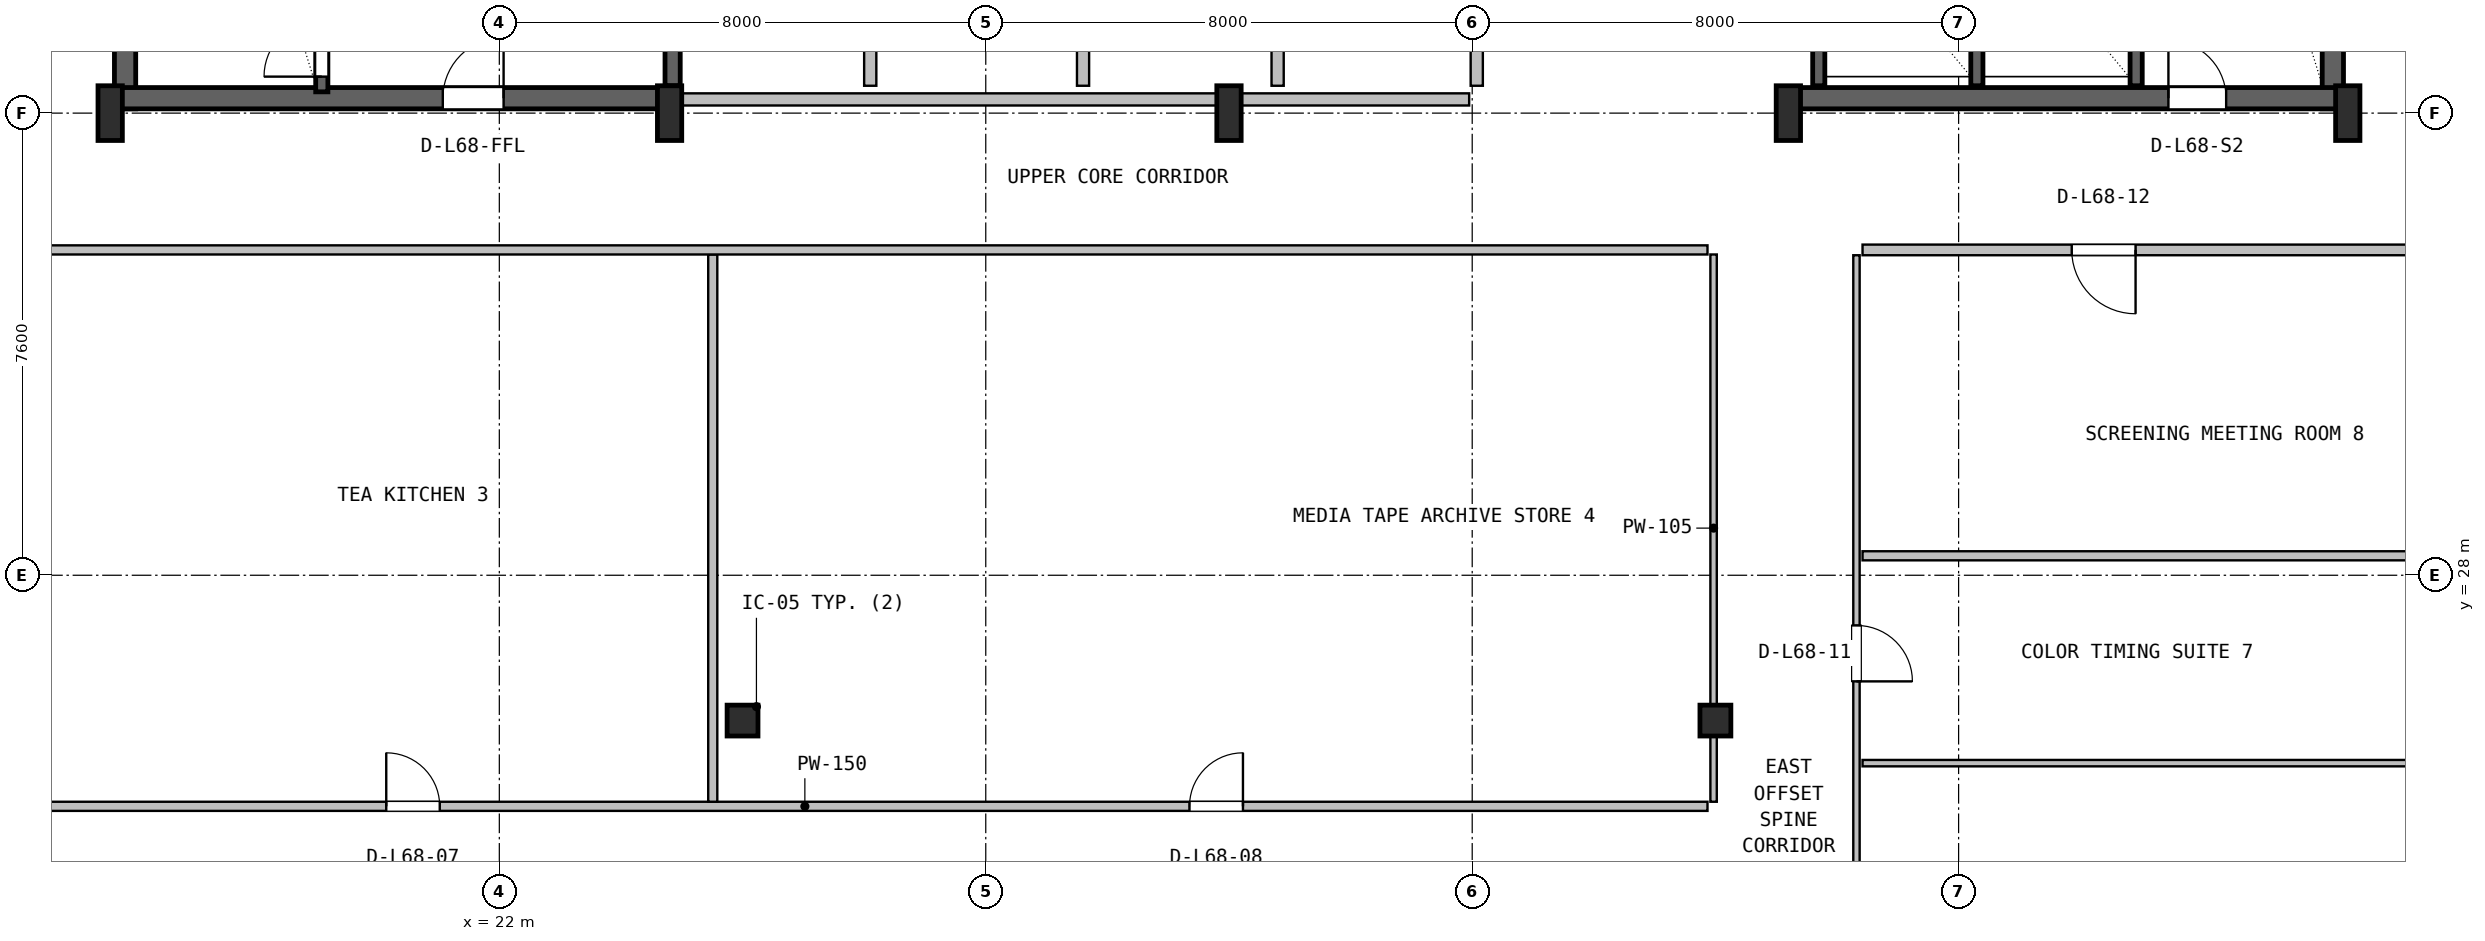
"""IFC4 building model, lengths in metres.
Left out: names, types, materials, properties, quantities, classifications, styles, units other than length and angle.
Written with IfcOpenShell. Run it as: python <this file> out.ifc"""

import sys

from ifc_helpers import new_model, si_unit, direction, frame, frame_2d, origin, origin_2d, place, context, subcontext, project, spatial, rectangle, hollow_circle, i_section, extrude, source, transform, mapped, element, fill, save


model = new_model("IFC4")
c1 = context("Model", 3, precision=1e-05, world=origin(), true_north=direction((0.0, 1.0)))
c2 = subcontext(c1, "Body", "Model", "MODEL_VIEW")
j1 = project(units=[si_unit("LENGTHUNIT", "METRE"), si_unit("PLANEANGLEUNIT", "RADIAN")], contexts=[c1])
p1 = place(None, origin())
s1 = spatial("IfcSite", under=j1, at=p1, CompositionType="ELEMENT")
p2 = place(p1, origin())
s2 = spatial("IfcBuilding", under=s1, at=p2, CompositionType="ELEMENT")
p3 = place(p2, frame((0.0, 0.0, 273.6)))
s3 = spatial("IfcBuildingStorey", under=s2, at=p3, CompositionType="ELEMENT", Elevation=273.6)
for number, where, z_axis, x_axis in (
    (1, (15.845, 35.67, 0.0), (0.0, 0.0, 1.0), (0.0, 1.0, 0.0)),
    (2, (52.155, 35.67, 0.0), (0.0, 0.0, 1.0), (0.0, 1.0, 0.0)),
):
    element("IfcWall", number, at=place(p3, frame(where, z_axis=z_axis, x_axis=x_axis)), inside=s3, PredefinedType="SHEAR", context=c2, shape_type="SweptSolid", body=[
        extrude(rectangle(XDim=11.13, YDim=0.35, at=frame_2d((5.565, 0.0))), origin(), (0.0, 0.0, 1.0), 3.55),
    ])
p4 = place(p3, frame((15.67, 35.845, 0.0), z_axis=(0.0, 0.0, 1.0), x_axis=(1.0, 0.0, 0.0)))
e3 = element("IfcWall", 3, at=p4, inside=s3, PredefinedType="SHEAR", context=c2, shape_type="SweptSolid", body=[
    extrude(rectangle(XDim=9.13, YDim=0.35, at=frame_2d((4.565, 0.0))), origin(), (0.0, 0.0, 1.0), 3.55),
])
p5 = place(p4, frame((5.4, 0.0, 0.0)))
e4 = element("IfcOpeningElement", 4, at=p5, cuts=e3, PredefinedType="OPENING", context=c2, shape_type="SweptSolid", body=[
    extrude(rectangle(XDim=1.0, YDim=2.1, at=frame_2d((0.5, 1.05))), frame((0.0, 0.185, 0.0), z_axis=(0.0, -1.0, 0.0), x_axis=(1.0, 0.0, 0.0)), (0.0, 0.0, 1.0), 0.37),
])
p6 = place(p3, frame((43.2, 35.845, 0.0), z_axis=(0.0, 0.0, 1.0), x_axis=(1.0, 0.0, 0.0)))
e5 = element("IfcWall", 5, at=p6, inside=s3, PredefinedType="SHEAR", context=c2, shape_type="SweptSolid", body=[
    extrude(rectangle(XDim=9.13, YDim=0.35, at=frame_2d((4.565, 0.0))), origin(), (0.0, 0.0, 1.0), 3.55),
])
p7 = place(p6, frame((6.25, 0.0, 0.0)))
e6 = element("IfcOpeningElement", 6, at=p7, cuts=e5, PredefinedType="OPENING", context=c2, shape_type="SweptSolid", body=[
    extrude(rectangle(XDim=0.95, YDim=2.1, at=frame_2d((0.475, 1.05))), frame((0.0, 0.185, 0.0), z_axis=(0.0, -1.0, 0.0), x_axis=(1.0, 0.0, 0.0)), (0.0, 0.0, 1.0), 0.37),
])
m1 = source(origin(), c2, "Body", "SweptSolid", [
    extrude(i_section(OverallWidth=0.4, OverallDepth=0.9, WebThickness=0.016, FlangeThickness=0.028, FilletRadius=0.016, at=origin_2d()), origin(), (0.0, 0.0, 1.0), 3.8),
])
for number, where, z_axis, x_axis in (
    (7, (15.6, 35.6, 0.0), (0.0, 0.0, 1.0), (1.0, 0.0, 0.0)),
    (8, (24.8, 35.6, 0.0), (0.0, 0.0, 1.0), (1.0, 0.0, 0.0)),
    (9, (34.0, 35.6, 0.0), (0.0, 0.0, 1.0), (1.0, 0.0, 0.0)),
    (10, (43.2, 35.6, 0.0), (0.0, 0.0, 1.0), (1.0, 0.0, 0.0)),
    (11, (52.4, 35.6, 0.0), (0.0, 0.0, 1.0), (1.0, 0.0, 0.0)),
):
    element("IfcColumn", number, at=place(p3, frame(where, z_axis=z_axis, x_axis=x_axis)), inside=s3, PredefinedType="COLUMN", context=c2, shape_type="MappedRepresentation", body=[
        mapped(m1, transform((0.0, 0.0, 0.0), x_axis=(1.0, 0.0, 0.0), y_axis=(0.0, 1.0, 0.0), z_axis=(0.0, 0.0, 1.0), scale=1.0)),
    ])
m2 = source(origin(), c2, "Body", "SweptSolid", [
    extrude(hollow_circle(Radius=0.254, WallThickness=0.02, at=origin_2d()), origin(), (0.0, 0.0, 1.0), 3.8),
])
for number, where, z_axis, x_axis in (
    (12, (26.0, 25.61, 0.0), (0.0, 0.0, 1.0), (1.0, 0.0, 0.0)),
    (13, (42.0, 25.61, 0.0), (0.0, 0.0, 1.0), (1.0, 0.0, 0.0)),
):
    element("IfcColumn", number, at=place(p3, frame(where, z_axis=z_axis, x_axis=x_axis)), inside=s3, PredefinedType="COLUMN", context=c2, shape_type="MappedRepresentation", body=[
        mapped(m2, transform((0.0, 0.0, 0.0), x_axis=(1.0, 0.0, 0.0), y_axis=(0.0, 1.0, 0.0), z_axis=(0.0, 0.0, 1.0), scale=1.0)),
    ])
p8 = place(p3, frame((19.08, 35.95, 0.0), z_axis=(0.0, 0.0, 1.0), x_axis=(0.0, 1.0, 0.0)))
e14 = element("IfcWall", 14, at=p8, inside=s3, PredefinedType="SHEAR", context=c2, shape_type="SweptSolid", body=[
    extrude(rectangle(XDim=9.65, YDim=0.2, at=frame_2d((4.825, 0.0))), origin(), (0.0, 0.0, 1.0), 3.55),
])
p9 = place(p8, frame((0.25, 0.0, 0.0)))
e15 = element("IfcOpeningElement", 15, at=p9, cuts=e14, PredefinedType="OPENING", context=c2, shape_type="SweptSolid", body=[
    extrude(rectangle(XDim=0.95, YDim=2.1, at=frame_2d((0.475, 1.05))), frame((0.0, 0.11, 0.0), z_axis=(0.0, -1.0, 0.0), x_axis=(1.0, 0.0, 0.0)), (0.0, 0.0, 1.0), 0.22),
])
p10 = place(p3, frame((24.85, 36.05, 0.0), z_axis=(0.0, 0.0, 1.0), x_axis=(0.0, 1.0, 0.0)))
e16 = element("IfcWall", 16, at=p10, inside=s3, PredefinedType="SHEAR", context=c2, shape_type="SweptSolid", body=[
    extrude(rectangle(XDim=10.45, YDim=0.25, at=frame_2d((5.225, 0.0))), origin(), (0.0, 0.0, 1.0), 3.55),
])
p11 = place(p3, frame((48.92, 36.05, 0.0), z_axis=(0.0, 0.0, 1.0), x_axis=(0.0, 1.0, 0.0)))
e17 = element("IfcWall", 17, at=p11, inside=s3, PredefinedType="SHEAR", context=c2, shape_type="SweptSolid", body=[
    extrude(rectangle(XDim=10.5, YDim=0.2, at=frame_2d((5.25, 0.0))), origin(), (0.0, 0.0, 1.0), 3.55),
])
for number, where, z_axis, x_axis in (
    (18, (43.7, 36.05, 0.0), (0.0, 0.0, 1.0), (0.0, 1.0, 0.0)),
    (19, (46.3, 36.05, 0.0), (0.0, 0.0, 1.0), (0.0, 1.0, 0.0)),
):
    element("IfcWall", number, at=place(p3, frame(where, z_axis=z_axis, x_axis=x_axis)), inside=s3, PredefinedType="SHEAR", context=c2, shape_type="SweptSolid", body=[
        extrude(rectangle(XDim=3.05, YDim=0.2, at=frame_2d((1.525, 0.0))), origin(), (0.0, 0.0, 1.0), 3.55),
    ])
p12 = place(p3, frame((25.0, 35.825, 0.0), z_axis=(0.0, 0.0, 1.0), x_axis=(1.0, 0.0, 0.0)))
e20 = element("IfcWall", 20, at=p12, inside=s3, PredefinedType="SOLIDWALL", context=c2, shape_type="SweptSolid", body=[
    extrude(rectangle(XDim=12.95, YDim=0.2, at=frame_2d((6.475, 0.0))), origin(), (0.0, 0.0, 1.0), 2.575),
])
for number, where, z_axis, x_axis in (
    (21, (28.1, 36.05, 0.0), (0.0, 0.0, 1.0), (0.0, 1.0, 0.0)),
    (22, (31.6, 36.05, 0.0), (0.0, 0.0, 1.0), (0.0, 1.0, 0.0)),
):
    element("IfcWall", number, at=place(p3, frame(where, z_axis=z_axis, x_axis=x_axis)), inside=s3, PredefinedType="PLUMBINGWALL", context=c2, shape_type="SweptSolid", body=[
        extrude(rectangle(XDim=3.1, YDim=0.2, at=frame_2d((1.55, 0.0))), origin(), (0.0, 0.0, 1.0), 3.53),
    ])
for number, where, z_axis, x_axis in (
    (23, (34.8, 36.05, 0.0), (0.0, 0.0, 1.0), (0.0, 1.0, 0.0)),
    (24, (38.075, 36.05, 0.0), (0.0, 0.0, 1.0), (0.0, 1.0, 0.0)),
):
    element("IfcWall", number, at=place(p3, frame(where, z_axis=z_axis, x_axis=x_axis)), inside=s3, PredefinedType="SOLIDWALL", context=c2, shape_type="SweptSolid", body=[
        extrude(rectangle(XDim=3.1, YDim=0.2, at=frame_2d((1.55, 0.0))), origin(), (0.0, 0.0, 1.0), 3.53),
    ])
p13 = place(p3, frame((12.18, 24.2, 0.0), z_axis=(0.0, 0.0, 1.0), x_axis=(1.0, 0.0, 0.0)))
e25 = element("IfcWall", 25, at=p13, inside=s3, PredefinedType="PARTITIONING", context=c2, shape_type="SweptSolid", body=[
    extrude(rectangle(XDim=29.69, YDim=0.15, at=frame_2d((14.845, 0.0))), origin(), (0.0, 0.0, 1.0), 2.981),
])
p14 = place(p13, frame((7.96, 0.0, 0.0)))
e26 = element("IfcOpeningElement", 26, at=p14, cuts=e25, PredefinedType="OPENING", context=c2, shape_type="SweptSolid", body=[
    extrude(rectangle(XDim=0.88, YDim=2.06, at=frame_2d((0.44, 1.03))), frame((0.0, 0.085, 0.0), z_axis=(0.0, -1.0, 0.0), x_axis=(1.0, 0.0, 0.0)), (0.0, 0.0, 1.0), 0.17),
])
p15 = place(p13, frame((21.17, 0.0, 0.0)))
e27 = element("IfcOpeningElement", 27, at=p15, cuts=e25, PredefinedType="OPENING", context=c2, shape_type="SweptSolid", body=[
    extrude(rectangle(XDim=0.88, YDim=2.06, at=frame_2d((0.44, 1.03))), frame((0.0, 0.085, 0.0), z_axis=(0.0, -1.0, 0.0), x_axis=(1.0, 0.0, 0.0)), (0.0, 0.0, 1.0), 0.17),
])
p16 = place(p3, frame((25.51, 24.275, 0.0), z_axis=(0.0, 0.0, 1.0), x_axis=(0.0, 1.0, 0.0)))
e28 = element("IfcWall", 28, at=p16, inside=s3, PredefinedType="PARTITIONING", context=c2, shape_type="SweptSolid", body=[
    extrude(rectangle(XDim=9.0, YDim=0.15, at=frame_2d((4.5, 0.0))), origin(), (0.0, 0.0, 1.0), 2.981),
])
p17 = place(p3, frame((12.18, 33.35, 0.0), z_axis=(0.0, 0.0, 1.0), x_axis=(1.0, 0.0, 0.0)))
e29 = element("IfcWall", 29, at=p17, inside=s3, PredefinedType="PARTITIONING", context=c2, shape_type="SweptSolid", body=[
    extrude(rectangle(XDim=29.69, YDim=0.15, at=frame_2d((14.845, 0.0))), origin(), (0.0, 0.0, 1.0), 2.981),
])
p18 = place(p3, frame((41.97, 24.275, 0.0), z_axis=(0.0, 0.0, 1.0), x_axis=(0.0, 1.0, 0.0)))
e30 = element("IfcWall", 30, at=p18, inside=s3, PredefinedType="PARTITIONING", context=c2, shape_type="SweptSolid", body=[
    extrude(rectangle(XDim=9.0, YDim=0.105, at=frame_2d((4.5, 0.0))), origin(), (0.0, 0.0, 1.0), 2.981),
])
p19 = place(p3, frame((44.32, 13.38, 0.0), z_axis=(0.0, 0.0, 1.0), x_axis=(0.0, 1.0, 0.0)))
e31 = element("IfcWall", 31, at=p19, inside=s3, PredefinedType="PARTITIONING", context=c2, shape_type="SweptSolid", body=[
    extrude(rectangle(XDim=19.883, YDim=0.105, at=frame_2d((9.941, 0.0))), origin(), (0.0, 0.0, 1.0), 3.171),
])
p20 = place(p19, frame((2.645, 0.0, 0.0)))
e32 = element("IfcOpeningElement", 32, at=p20, cuts=e31, PredefinedType="OPENING", context=c2, shape_type="SweptSolid", body=[
    extrude(rectangle(XDim=0.88, YDim=2.06, at=frame_2d((0.44, 1.03))), frame((0.0, 0.062, 0.0), z_axis=(0.0, -1.0, 0.0), x_axis=(1.0, 0.0, 0.0)), (0.0, 0.0, 1.0), 0.125),
])
p21 = place(p19, frame((8.055, 0.0, 0.0)))
e33 = element("IfcOpeningElement", 33, at=p21, cuts=e31, PredefinedType="OPENING", context=c2, shape_type="SweptSolid", body=[
    extrude(rectangle(XDim=0.88, YDim=2.06, at=frame_2d((0.44, 1.03))), frame((0.0, 0.062, 0.0), z_axis=(0.0, -1.0, 0.0), x_axis=(1.0, 0.0, 0.0)), (0.0, 0.0, 1.0), 0.125),
])
p22 = place(p19, frame((12.875, 0.0, 0.0)))
e34 = element("IfcOpeningElement", 34, at=p22, cuts=e31, PredefinedType="OPENING", context=c2, shape_type="SweptSolid", body=[
    extrude(rectangle(XDim=0.92, YDim=2.08, at=frame_2d((0.46, 1.04))), frame((0.0, 0.062, 0.0), z_axis=(0.0, -1.0, 0.0), x_axis=(1.0, 0.0, 0.0)), (0.0, 0.0, 1.0), 0.125),
])
p23 = place(p3, frame((44.42, 24.91, 0.0), z_axis=(0.0, 0.0, 1.0), x_axis=(1.0, 0.0, 0.0)))
e35 = element("IfcWall", 35, at=p23, inside=s3, PredefinedType="PARTITIONING", context=c2, shape_type="SweptSolid", body=[
    extrude(rectangle(XDim=11.4, YDim=0.105, at=frame_2d((5.7, 0.0))), origin(), (0.0, 0.0, 1.0), 3.171),
])
p24 = place(p3, frame((44.42, 28.32, 0.0), z_axis=(0.0, 0.0, 1.0), x_axis=(1.0, 0.0, 0.0)))
e36 = element("IfcWall", 36, at=p24, inside=s3, PredefinedType="PARTITIONING", context=c2, shape_type="SweptSolid", body=[
    extrude(rectangle(XDim=11.4, YDim=0.15, at=frame_2d((5.7, 0.0))), origin(), (0.0, 0.0, 1.0), 3.171),
])
p25 = place(p3, frame((44.42, 33.35, 0.0), z_axis=(0.0, 0.0, 1.0), x_axis=(1.0, 0.0, 0.0)))
e37 = element("IfcWall", 37, at=p25, inside=s3, PredefinedType="PARTITIONING", context=c2, shape_type="SweptSolid", body=[
    extrude(rectangle(XDim=11.4, YDim=0.175, at=frame_2d((5.7, 0.0))), origin(), (0.0, 0.0, 1.0), 3.171),
])
p26 = place(p25, frame((3.44, 0.0, 0.0)))
e38 = element("IfcOpeningElement", 38, at=p26, cuts=e37, PredefinedType="OPENING", context=c2, shape_type="SweptSolid", body=[
    extrude(rectangle(XDim=1.05, YDim=2.1, at=frame_2d((0.525, 1.05))), frame((0.0, 0.098, 0.0), z_axis=(0.0, -1.0, 0.0), x_axis=(1.0, 0.0, 0.0)), (0.0, 0.0, 1.0), 0.195),
])
m3 = source(origin(), c2, "Body", "SweptSolid", [
    extrude(rectangle(XDim=0.95, YDim=2.1, at=frame_2d((0.475, 1.05))), frame((0.0, 0.025, 0.0), z_axis=(0.0, -1.0, 0.0), x_axis=(1.0, 0.0, 0.0)), (0.0, 0.0, 1.0), 0.05),
])
p27 = place(p9, origin())
e39 = element("IfcDoor", 39, at=p27, inside=s3, OperationType="SINGLE_SWING_LEFT", PredefinedType="DOOR", context=c2, shape_type="MappedRepresentation", body=[
    mapped(m3, transform((0.0, 0.0, 0.0), x_axis=(1.0, 0.0, 0.0), y_axis=(0.0, 1.0, 0.0), z_axis=(0.0, 0.0, 1.0), scale=1.0)),
])
fill(e15, e39)
m4 = source(origin(), c2, "Body", "SweptSolid", [
    extrude(rectangle(XDim=1.0, YDim=2.1, at=frame_2d((0.5, 1.05))), frame((0.0, 0.025, 0.0), z_axis=(0.0, -1.0, 0.0), x_axis=(1.0, 0.0, 0.0)), (0.0, 0.0, 1.0), 0.05),
])
p28 = place(p5, origin())
e40 = element("IfcDoor", 40, at=p28, inside=s3, OperationType="SINGLE_SWING_RIGHT", PredefinedType="DOOR", context=c2, shape_type="MappedRepresentation", body=[
    mapped(m4, transform((0.0, 0.0, 0.0), x_axis=(1.0, 0.0, 0.0), y_axis=(0.0, 1.0, 0.0), z_axis=(0.0, 0.0, 1.0), scale=1.0)),
])
fill(e4, e40)
p29 = place(p7, origin())
e41 = element("IfcDoor", 41, at=p29, inside=s3, OperationType="SINGLE_SWING_LEFT", PredefinedType="DOOR", context=c2, shape_type="MappedRepresentation", body=[
    mapped(m3, transform((0.0, 0.0, 0.0), x_axis=(1.0, 0.0, 0.0), y_axis=(0.0, 1.0, 0.0), z_axis=(0.0, 0.0, 1.0), scale=1.0)),
])
fill(e6, e41)
m5 = source(origin(), c2, "Body", "SweptSolid", [
    extrude(rectangle(XDim=0.88, YDim=2.06, at=frame_2d((0.44, 1.03))), frame((0.0, 0.025, 0.0), z_axis=(0.0, -1.0, 0.0), x_axis=(1.0, 0.0, 0.0)), (0.0, 0.0, 1.0), 0.05),
])
p30 = place(p14, origin())
e42 = element("IfcDoor", 42, at=p30, inside=s3, OperationType="SINGLE_SWING_LEFT", PredefinedType="DOOR", context=c2, shape_type="MappedRepresentation", body=[
    mapped(m5, transform((0.0, 0.0, 0.0), x_axis=(1.0, 0.0, 0.0), y_axis=(0.0, 1.0, 0.0), z_axis=(0.0, 0.0, 1.0), scale=1.0)),
])
fill(e26, e42)
p31 = place(p15, origin())
e43 = element("IfcDoor", 43, at=p31, inside=s3, OperationType="SINGLE_SWING_RIGHT", PredefinedType="DOOR", context=c2, shape_type="MappedRepresentation", body=[
    mapped(m5, transform((0.0, 0.0, 0.0), x_axis=(1.0, 0.0, 0.0), y_axis=(0.0, 1.0, 0.0), z_axis=(0.0, 0.0, 1.0), scale=1.0)),
])
fill(e27, e43)
m6 = source(origin(), c2, "Body", "SweptSolid", [
    extrude(rectangle(XDim=0.92, YDim=2.08, at=frame_2d((0.46, 1.04))), frame((0.0, 0.025, 0.0), z_axis=(0.0, -1.0, 0.0), x_axis=(1.0, 0.0, 0.0)), (0.0, 0.0, 1.0), 0.05),
])
p32 = place(p22, frame((0.92, 0.0, 0.0), z_axis=(0.0, 0.0, 1.0), x_axis=(-1.0, 0.0, 0.0)))
e44 = element("IfcDoor", 44, at=p32, inside=s3, OperationType="SINGLE_SWING_LEFT", PredefinedType="DOOR", context=c2, shape_type="MappedRepresentation", body=[
    mapped(m6, transform((0.0, 0.0, 0.0), x_axis=(1.0, 0.0, 0.0), y_axis=(0.0, 1.0, 0.0), z_axis=(0.0, 0.0, 1.0), scale=1.0)),
])
fill(e34, e44)
m7 = source(origin(), c2, "Body", "SweptSolid", [
    extrude(rectangle(XDim=1.05, YDim=2.1, at=frame_2d((0.525, 1.05))), frame((0.0, 0.025, 0.0), z_axis=(0.0, -1.0, 0.0), x_axis=(1.0, 0.0, 0.0)), (0.0, 0.0, 1.0), 0.05),
])
p33 = place(p26, frame((1.05, 0.0, 0.0), z_axis=(0.0, 0.0, 1.0), x_axis=(-1.0, 0.0, 0.0)))
e45 = element("IfcDoor", 45, at=p33, inside=s3, OperationType="SINGLE_SWING_RIGHT", PredefinedType="DOOR", context=c2, shape_type="MappedRepresentation", body=[
    mapped(m7, transform((0.0, 0.0, 0.0), x_axis=(1.0, 0.0, 0.0), y_axis=(0.0, 1.0, 0.0), z_axis=(0.0, 0.0, 1.0), scale=1.0)),
])
fill(e38, e45)
save(model, sys.argv[1])
